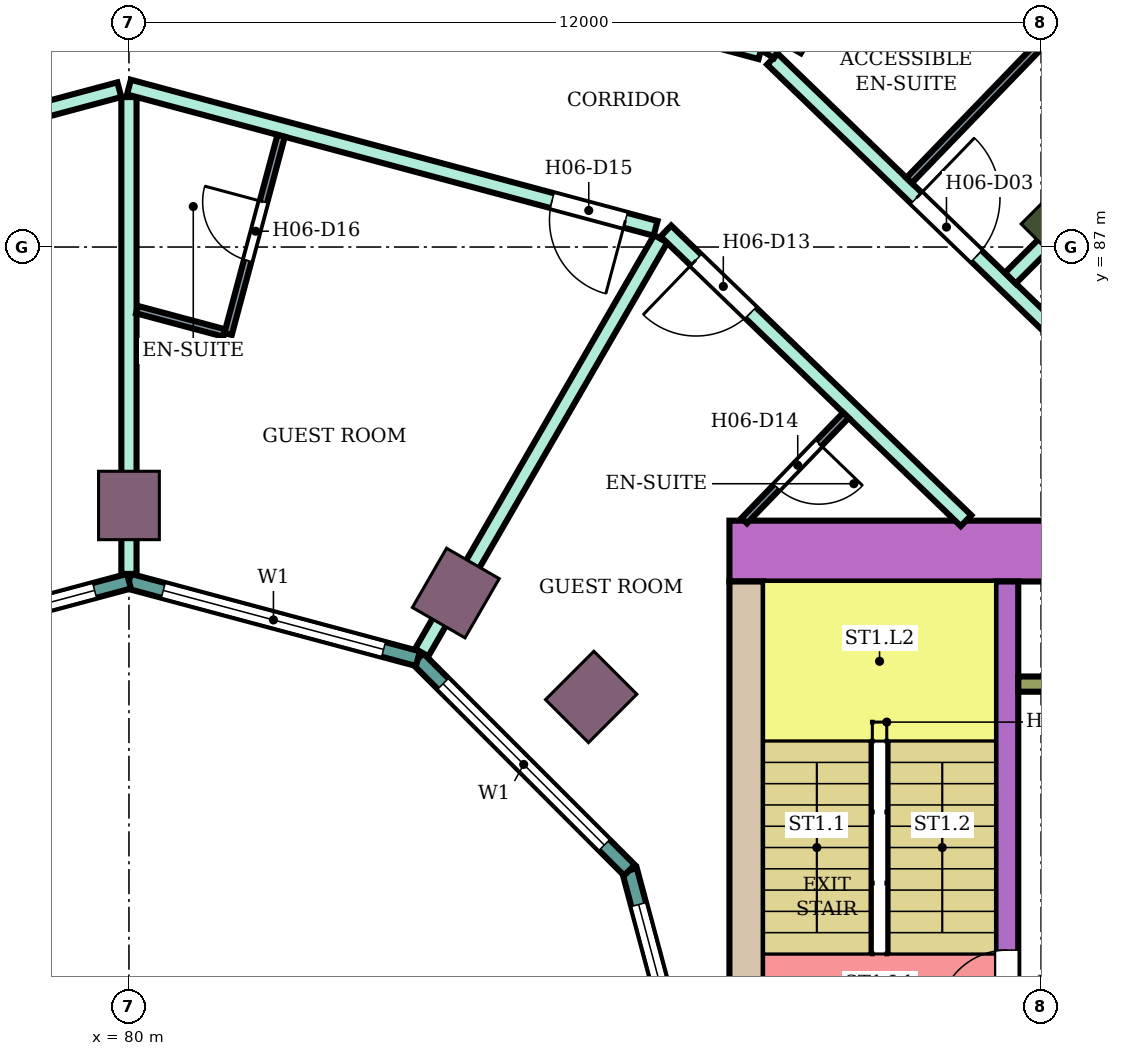
"""IFC4 building model, lengths in metres.
Left out: names, types, materials, properties, quantities, classifications, styles, units other than length and angle.
Written with IfcOpenShell. Run it as: python <this file> out.ifc"""

import sys

from ifc_helpers import new_model, si_unit, direction, frame, frame_2d, origin, origin_2d, place, context, subcontext, project, spatial, rectangle, extrude, element, fill, save


model = new_model("IFC4")
c1 = context("Model", 3, precision=1e-05, world=origin(), true_north=direction((0.0, 1.0)))
c2 = subcontext(c1, "Body", "Model", "MODEL_VIEW")
j1 = project(units=[si_unit("LENGTHUNIT", "METRE"), si_unit("PLANEANGLEUNIT", "RADIAN")], contexts=[c1])
p1 = place(None, origin())
s1 = spatial("IfcSite", under=j1, at=p1, CompositionType="ELEMENT")
p2 = place(p1, origin())
s2 = spatial("IfcBuilding", under=s1, at=p2, CompositionType="ELEMENT")
p3 = place(p2, frame((0.0, 0.0, 93.8)))
s3 = spatial("IfcBuildingStorey", under=s2, at=p3, CompositionType="ELEMENT", Elevation=93.8)
for number, where, z_axis, x_axis in (
    (1, (92.445, 87.445, 0.0), (0.0, 0.0, 1.0), (0.707, 0.707, 0.0)),
    (2, (88.8, 90.242, 0.0), (0.0, 0.0, 1.0), (0.5, 0.866, 0.0)),
):
    element("IfcColumn", number, at=place(p3, frame(where, z_axis=z_axis, x_axis=x_axis)), inside=s3, PredefinedType="COLUMN", context=c2, shape_type="SweptSolid", body=[
        extrude(rectangle(XDim=1.2, YDim=0.8, at=origin_2d()), origin(), (0.0, 0.0, 1.0), 3.8),
    ])
for number, where, z_axis, x_axis in (
    (3, (86.081, 81.081, 0.0), (0.0, 0.0, 1.0), (0.707, 0.707, 0.0)),
    (4, (84.3, 82.448, 0.0), (0.0, 0.0, 1.0), (0.5, 0.866, 0.0)),
    (5, (80.0, 83.6, 0.0), (0.0, 0.0, 1.0), (0.0, 1.0, 0.0)),
):
    element("IfcColumn", number, at=place(p3, frame(where, z_axis=z_axis, x_axis=x_axis)), inside=s3, PredefinedType="COLUMN", context=c2, shape_type="SweptSolid", body=[
        extrude(rectangle(XDim=0.9, YDim=0.8, at=origin_2d()), origin(), (0.0, 0.0, 1.0), 3.8),
    ])
p4 = place(p3, frame((87.9, 83.0, 0.0), z_axis=(0.0, 0.0, 1.0), x_axis=(1.0, 0.0, 0.0)))
e6 = element("IfcWall", 6, at=p4, inside=s3, PredefinedType="SHEAR", context=c2, shape_type="SweptSolid", body=[
    extrude(rectangle(XDim=14.7, YDim=0.8, at=frame_2d((7.35, 0.0))), origin(), (0.0, 0.0, 1.0), 3.48),
])
p5 = place(p4, frame((4.2, 0.0, 0.0)))
e7 = element("IfcOpeningElement", 7, at=p5, cuts=e6, PredefinedType="OPENING", context=c2, shape_type="SweptSolid", body=[
    extrude(rectangle(XDim=2.4, YDim=2.4, at=frame_2d((1.2, 1.2))), frame((0.0, 0.41, 0.0), z_axis=(0.0, -1.0, 0.0), x_axis=(1.0, 0.0, 0.0)), (0.0, 0.0, 1.0), 0.82),
])
p6 = place(p3, frame((88.125, 75.0, 0.0), z_axis=(0.0, 0.0, 1.0), x_axis=(0.0, 1.0, 0.0)))
e8 = element("IfcWall", 8, at=p6, inside=s3, PredefinedType="SHEAR", context=c2, shape_type="SweptSolid", body=[
    extrude(rectangle(XDim=7.6, YDim=0.45, at=frame_2d((3.8, 0.0))), origin(), (0.0, 0.0, 1.0), 3.48),
])
p7 = place(p3, frame((91.55, 75.0, 0.0), z_axis=(0.0, 0.0, 1.0), x_axis=(0.0, 1.0, 0.0)))
e9 = element("IfcWall", 9, at=p7, inside=s3, PredefinedType="SHEAR", context=c2, shape_type="SweptSolid", body=[
    extrude(rectangle(XDim=7.6, YDim=0.3, at=frame_2d((3.8, 0.0))), origin(), (0.0, 0.0, 1.0), 3.48),
])
p8 = place(p7, frame((1.85, 0.0, 0.0)))
e10 = element("IfcOpeningElement", 10, at=p8, cuts=e9, PredefinedType="OPENING", context=c2, shape_type="SweptSolid", body=[
    extrude(rectangle(XDim=0.9, YDim=2.1, at=frame_2d((0.45, 1.05))), frame((0.0, 0.16, 0.0), z_axis=(0.0, -1.0, 0.0), x_axis=(1.0, 0.0, 0.0)), (0.0, 0.0, 1.0), 0.32),
])
p9 = place(p3, frame((91.7, 81.25, 0.0), z_axis=(0.0, 0.0, 1.0), x_axis=(1.0, 0.0, 0.0)))
e11 = element("IfcWall", 11, at=p9, inside=s3, PredefinedType="SHEAR", context=c2, shape_type="SweptSolid", body=[
    extrude(rectangle(XDim=4.65, YDim=0.2, at=frame_2d((2.325, 0.0))), origin(), (0.0, 0.0, 1.0), 3.48),
])
p10 = place(p3, frame((87.604, 75.0, 0.0), z_axis=(0.0, 0.0, 1.0), x_axis=(-0.258789828301, 0.965933654434, 0.0)))
e12 = element("IfcWall", 12, at=p10, inside=s3, PredefinedType="NOTDEFINED", context=c2, shape_type="SweptSolid", body=[
    extrude(rectangle(XDim=3.936, YDim=0.2, at=frame_2d((1.968, 0.0))), origin(), (0.0, 0.0, 1.0), 3.8),
])
p11 = place(p10, frame((0.468, 0.0, 0.9)))
e13 = element("IfcOpeningElement", 13, at=p11, cuts=e12, PredefinedType="OPENING", context=c2, shape_type="SweptSolid", body=[
    extrude(rectangle(XDim=3.0, YDim=2.3, at=frame_2d((1.5, 1.15))), frame((0.0, 0.11, 0.0), z_axis=(0.0, -1.0, 0.0), x_axis=(1.0, 0.0, 0.0)), (0.0, 0.0, 1.0), 0.22),
])
p12 = place(p3, frame((86.585, 78.802, 0.0), z_axis=(0.0, 0.0, 1.0), x_axis=(-0.707106781187, 0.707106781187, 0.0)))
e14 = element("IfcWall", 14, at=p12, inside=s3, PredefinedType="NOTDEFINED", context=c2, shape_type="SweptSolid", body=[
    extrude(rectangle(XDim=3.936, YDim=0.2, at=frame_2d((1.968, 0.0))), origin(), (0.0, 0.0, 1.0), 3.8),
])
p13 = place(p12, frame((0.468, 0.0, 0.9)))
e15 = element("IfcOpeningElement", 15, at=p13, cuts=e14, PredefinedType="OPENING", context=c2, shape_type="SweptSolid", body=[
    extrude(rectangle(XDim=3.0, YDim=2.3, at=frame_2d((1.5, 1.15))), frame((0.0, 0.11, 0.0), z_axis=(0.0, -1.0, 0.0), x_axis=(1.0, 0.0, 0.0)), (0.0, 0.0, 1.0), 0.22),
])
p14 = place(p3, frame((83.802, 81.585, 0.0), z_axis=(0.0, 0.0, 1.0), x_axis=(-0.965933654434, 0.258789828301, 0.0)))
e16 = element("IfcWall", 16, at=p14, inside=s3, PredefinedType="NOTDEFINED", context=c2, shape_type="SweptSolid", body=[
    extrude(rectangle(XDim=3.936, YDim=0.2, at=frame_2d((1.968, 0.0))), origin(), (0.0, 0.0, 1.0), 3.8),
])
p15 = place(p14, frame((0.468, 0.0, 0.9)))
e17 = element("IfcOpeningElement", 17, at=p15, cuts=e16, PredefinedType="OPENING", context=c2, shape_type="SweptSolid", body=[
    extrude(rectangle(XDim=3.0, YDim=2.3, at=frame_2d((1.5, 1.15))), frame((0.0, 0.11, 0.0), z_axis=(0.0, -1.0, 0.0), x_axis=(1.0, 0.0, 0.0)), (0.0, 0.0, 1.0), 0.22),
])
p16 = place(p3, frame((80.0, 82.604, 0.0), z_axis=(0.0, 0.0, 1.0), x_axis=(-0.965933654434, -0.258789828301, 0.0)))
e18 = element("IfcWall", 18, at=p16, inside=s3, PredefinedType="NOTDEFINED", context=c2, shape_type="SweptSolid", body=[
    extrude(rectangle(XDim=3.936, YDim=0.2, at=frame_2d((1.968, 0.0))), origin(), (0.0, 0.0, 1.0), 3.8),
])
p17 = place(p16, frame((0.468, 0.0, 0.9)))
e19 = element("IfcOpeningElement", 19, at=p17, cuts=e18, PredefinedType="OPENING", context=c2, shape_type="SweptSolid", body=[
    extrude(rectangle(XDim=3.0, YDim=2.3, at=frame_2d((1.5, 1.15))), frame((0.0, 0.11, 0.0), z_axis=(0.0, -1.0, 0.0), x_axis=(1.0, 0.0, 0.0)), (0.0, 0.0, 1.0), 0.22),
])
p18 = place(p3, frame((71.614, 89.55, 0.0), z_axis=(0.0, 0.0, 1.0), x_axis=(0.965982378603, 0.258607896685, 0.0)))
e20 = element("IfcWall", 20, at=p18, inside=s3, PredefinedType="PARTITIONING", context=c2, shape_type="SweptSolid", body=[
    extrude(rectangle(XDim=8.632, YDim=0.2, at=frame_2d((4.316, 0.0))), origin(), (0.0, 0.0, 1.0), 3.35),
])
p19 = place(p18, frame((2.804, 0.0, 0.0)))
e21 = element("IfcOpeningElement", 21, at=p19, cuts=e20, PredefinedType="OPENING", context=c2, shape_type="SweptSolid", body=[
    extrude(rectangle(XDim=1.0, YDim=2.1, at=frame_2d((0.5, 1.05))), frame((0.0, 0.11, 0.0), z_axis=(0.0, -1.0, 0.0), x_axis=(1.0, 0.0, 0.0)), (0.0, 0.0, 1.0), 0.22),
])
p20 = place(p3, frame((72.936, 87.211, 0.0), z_axis=(0.0, 0.0, 1.0), x_axis=(0.965917703859, 0.258849356521, 0.0)))
e22 = element("IfcWall", 22, at=p20, inside=s3, PredefinedType="PARTITIONING", context=c2, shape_type="SweptSolid", body=[
    extrude(rectangle(XDim=7.182, YDim=0.2, at=frame_2d((3.591, 0.0))), origin(), (0.0, 0.0, 1.0), 3.35),
])
p21 = place(p20, frame((2.757, 0.0, 0.0)))
e23 = element("IfcOpeningElement", 23, at=p21, cuts=e22, PredefinedType="OPENING", context=c2, shape_type="SweptSolid", body=[
    extrude(rectangle(XDim=1.8, YDim=2.1, at=frame_2d((0.9, 1.05))), frame((0.0, 0.11, 0.0), z_axis=(0.0, -1.0, 0.0), x_axis=(1.0, 0.0, 0.0)), (0.0, 0.0, 1.0), 0.22),
])
p22 = place(p3, frame((80.0, 82.7, 0.0), z_axis=(0.0, 0.0, 1.0), x_axis=(0.0, 1.0, 0.0)))
e24 = element("IfcWall", 24, at=p22, inside=s3, PredefinedType="PARTITIONING", context=c2, shape_type="SweptSolid", body=[
    extrude(rectangle(XDim=6.273, YDim=0.2, at=frame_2d((3.136, 0.0))), origin(), (0.0, 0.0, 1.0), 3.35),
])
p23 = place(p3, frame((80.0, 89.104, 0.0), z_axis=(0.0, 0.0, 1.0), x_axis=(0.965856548257, -0.259077455964, 0.0)))
e25 = element("IfcWall", 25, at=p23, inside=s3, PredefinedType="PARTITIONING", context=c2, shape_type="SweptSolid", body=[
    extrude(rectangle(XDim=7.173, YDim=0.2, at=frame_2d((3.586, 0.0))), origin(), (0.0, 0.0, 1.0), 3.35),
])
p24 = place(p23, frame((5.763, 0.0, 0.0)))
e26 = element("IfcOpeningElement", 26, at=p24, cuts=e25, PredefinedType="OPENING", context=c2, shape_type="SweptSolid", body=[
    extrude(rectangle(XDim=1.0, YDim=2.1, at=frame_2d((0.5, 1.05))), frame((0.0, 0.11, 0.0), z_axis=(0.0, -1.0, 0.0), x_axis=(1.0, 0.0, 0.0)), (0.0, 0.0, 1.0), 0.22),
])
p25 = place(p3, frame((80.0, 91.796, 0.0), z_axis=(0.0, 0.0, 1.0), x_axis=(0.965917643923, -0.258849580177, 0.0)))
e27 = element("IfcWall", 27, at=p25, inside=s3, PredefinedType="PARTITIONING", context=c2, shape_type="SweptSolid", body=[
    extrude(rectangle(XDim=8.602, YDim=0.2, at=frame_2d((4.301, 0.0))), origin(), (0.0, 0.0, 1.0), 3.35),
])
p26 = place(p25, frame((2.091, 0.0, 0.0)))
e28 = element("IfcOpeningElement", 28, at=p26, cuts=e27, PredefinedType="OPENING", context=c2, shape_type="SweptSolid", body=[
    extrude(rectangle(XDim=1.8, YDim=2.1, at=frame_2d((0.9, 1.05))), frame((0.0, 0.11, 0.0), z_axis=(0.0, -1.0, 0.0), x_axis=(1.0, 0.0, 0.0)), (0.0, 0.0, 1.0), 0.22),
])
p27 = place(p3, frame((83.852, 81.665, 0.0), z_axis=(0.0, 0.0, 1.0), x_axis=(0.500236829077, 0.86588862727, 0.0)))
e29 = element("IfcWall", 29, at=p27, inside=s3, PredefinedType="PARTITIONING", context=c2, shape_type="SweptSolid", body=[
    extrude(rectangle(XDim=6.286, YDim=0.2, at=frame_2d((3.143, 0.0))), origin(), (0.0, 0.0, 1.0), 3.35),
])
p28 = place(p3, frame((87.064, 87.211, 0.0), z_axis=(0.0, 0.0, 1.0), x_axis=(0.719540958932, -0.694450004262, 0.0)))
e30 = element("IfcWall", 30, at=p28, inside=s3, PredefinedType="PARTITIONING", context=c2, shape_type="SweptSolid", body=[
    extrude(rectangle(XDim=5.488, YDim=0.2, at=frame_2d((2.744, 0.0))), origin(), (0.0, 0.0, 1.0), 3.35),
])
p29 = place(p28, frame((0.55, 0.0, 0.0)))
e31 = element("IfcOpeningElement", 31, at=p29, cuts=e30, PredefinedType="OPENING", context=c2, shape_type="SweptSolid", body=[
    extrude(rectangle(XDim=1.0, YDim=2.1, at=frame_2d((0.5, 1.05))), frame((0.0, 0.11, 0.0), z_axis=(0.0, -1.0, 0.0), x_axis=(1.0, 0.0, 0.0)), (0.0, 0.0, 1.0), 0.22),
])
p30 = place(p3, frame((88.465, 89.473, 0.0), z_axis=(0.0, 0.0, 1.0), x_axis=(0.719474304909, -0.694519059908, 0.0)))
e32 = element("IfcWall", 32, at=p30, inside=s3, PredefinedType="PARTITIONING", context=c2, shape_type="SweptSolid", body=[
    extrude(rectangle(XDim=6.525, YDim=0.2, at=frame_2d((3.263, 0.0))), origin(), (0.0, 0.0, 1.0), 3.35),
])
p31 = place(p30, frame((2.633, 0.0, 0.0)))
e33 = element("IfcOpeningElement", 33, at=p31, cuts=e32, PredefinedType="OPENING", context=c2, shape_type="SweptSolid", body=[
    extrude(rectangle(XDim=1.1, YDim=2.1, at=frame_2d((0.55, 1.05))), frame((0.0, 0.11, 0.0), z_axis=(0.0, -1.0, 0.0), x_axis=(1.0, 0.0, 0.0)), (0.0, 0.0, 1.0), 0.22),
])
p32 = place(p3, frame((88.4, 89.538, 0.0), z_axis=(0.0, 0.0, 1.0), x_axis=(0.500234695877, 0.865889859648, 0.0)))
e34 = element("IfcWall", 34, at=p32, inside=s3, PredefinedType="PARTITIONING", context=c2, shape_type="SweptSolid", body=[
    extrude(rectangle(XDim=9.007, YDim=0.2, at=frame_2d((4.503, 0.0))), origin(), (0.0, 0.0, 1.0), 3.35),
])
p33 = place(p3, frame((91.595, 86.59, 0.0), z_axis=(0.0, 0.0, 1.0), x_axis=(0.707232337591, 0.706981202484, 0.0)))
e35 = element("IfcWall", 35, at=p33, inside=s3, PredefinedType="PARTITIONING", context=c2, shape_type="SweptSolid", body=[
    extrude(rectangle(XDim=6.805, YDim=0.2, at=frame_2d((3.402, 0.0))), origin(), (0.0, 0.0, 1.0), 3.35),
])
p34 = place(p3, frame((80.106, 86.177, 0.0), z_axis=(0.0, 0.0, 1.0), x_axis=(0.966002973184, -0.258530957139, 0.0)))
e36 = element("IfcWall", 36, at=p34, inside=s3, PredefinedType="PARTITIONING", context=c2, shape_type="SweptSolid", body=[
    extrude(rectangle(XDim=1.19, YDim=0.1, at=frame_2d((0.595, 0.0))), origin(), (0.0, 0.0, 1.0), 3.35),
])
p35 = place(p3, frame((81.304, 85.856, 0.0), z_axis=(0.0, 0.0, 1.0), x_axis=(0.25867580527, 0.965964195904, 0.0)))
e37 = element("IfcWall", 37, at=p35, inside=s3, PredefinedType="PARTITIONING", context=c2, shape_type="SweptSolid", body=[
    extrude(rectangle(XDim=2.699, YDim=0.1, at=frame_2d((1.35, 0.0))), origin(), (0.0, 0.0, 1.0), 3.35),
])
p36 = place(p35, frame((1.0, 0.0, 0.0)))
e38 = element("IfcOpeningElement", 38, at=p36, cuts=e37, PredefinedType="OPENING", context=c2, shape_type="SweptSolid", body=[
    extrude(rectangle(XDim=0.8, YDim=2.1, at=frame_2d((0.4, 1.05))), frame((0.0, 0.06, 0.0), z_axis=(0.0, -1.0, 0.0), x_axis=(1.0, 0.0, 0.0)), (0.0, 0.0, 1.0), 0.12),
])
p37 = place(p3, frame((88.095, 83.4, 0.0), z_axis=(0.0, 0.0, 1.0), x_axis=(0.694447472534, 0.719543402368, 0.0)))
e39 = element("IfcWall", 39, at=p37, inside=s3, PredefinedType="PARTITIONING", context=c2, shape_type="SweptSolid", body=[
    extrude(rectangle(XDim=1.926, YDim=0.1, at=frame_2d((0.963, 0.0))), origin(), (0.0, 0.0, 1.0), 3.35),
])
p38 = place(p37, frame((0.613, 0.0, 0.0)))
e40 = element("IfcOpeningElement", 40, at=p38, cuts=e39, PredefinedType="OPENING", context=c2, shape_type="SweptSolid", body=[
    extrude(rectangle(XDim=0.8, YDim=2.1, at=frame_2d((0.4, 1.05))), frame((0.0, 0.06, 0.0), z_axis=(0.0, -1.0, 0.0), x_axis=(1.0, 0.0, 0.0)), (0.0, 0.0, 1.0), 0.12),
])
p39 = place(p3, frame((90.263, 87.876, 0.0), z_axis=(0.0, 0.0, 1.0), x_axis=(0.694534400859, 0.719459495749, 0.0)))
e41 = element("IfcWall", 41, at=p39, inside=s3, PredefinedType="PARTITIONING", context=c2, shape_type="SweptSolid", body=[
    extrude(rectangle(XDim=2.899, YDim=0.1, at=frame_2d((1.45, 0.0))), origin(), (0.0, 0.0, 1.0), 3.35),
])
p40 = place(p11, origin())
e42 = element("IfcWindow", 42, at=p40, inside=s3, PartitioningType="SINGLE_PANEL", PredefinedType="WINDOW", context=c2, shape_type="SweptSolid", body=[
    extrude(rectangle(XDim=3.0, YDim=2.3, at=frame_2d((1.5, 1.15))), frame((0.0, 0.03, 0.0), z_axis=(0.0, -1.0, 0.0), x_axis=(1.0, 0.0, 0.0)), (0.0, 0.0, 1.0), 0.06),
])
fill(e13, e42)
p41 = place(p13, origin())
e43 = element("IfcWindow", 43, at=p41, inside=s3, PartitioningType="SINGLE_PANEL", PredefinedType="WINDOW", context=c2, shape_type="SweptSolid", body=[
    extrude(rectangle(XDim=3.0, YDim=2.3, at=frame_2d((1.5, 1.15))), frame((0.0, 0.03, 0.0), z_axis=(0.0, -1.0, 0.0), x_axis=(1.0, 0.0, 0.0)), (0.0, 0.0, 1.0), 0.06),
])
fill(e15, e43)
p42 = place(p15, origin())
e44 = element("IfcWindow", 44, at=p42, inside=s3, PartitioningType="SINGLE_PANEL", PredefinedType="WINDOW", context=c2, shape_type="SweptSolid", body=[
    extrude(rectangle(XDim=3.0, YDim=2.3, at=frame_2d((1.5, 1.15))), frame((0.0, 0.03, 0.0), z_axis=(0.0, -1.0, 0.0), x_axis=(1.0, 0.0, 0.0)), (0.0, 0.0, 1.0), 0.06),
])
fill(e17, e44)
p43 = place(p17, origin())
e45 = element("IfcWindow", 45, at=p43, inside=s3, PartitioningType="SINGLE_PANEL", PredefinedType="WINDOW", context=c2, shape_type="SweptSolid", body=[
    extrude(rectangle(XDim=3.0, YDim=2.3, at=frame_2d((1.5, 1.15))), frame((0.0, 0.03, 0.0), z_axis=(0.0, -1.0, 0.0), x_axis=(1.0, 0.0, 0.0)), (0.0, 0.0, 1.0), 0.06),
])
fill(e19, e45)
p44 = place(p31, origin())
e46 = element("IfcDoor", 46, at=p44, inside=s3, OperationType="SINGLE_SWING_LEFT", PredefinedType="DOOR", context=c2, shape_type="SweptSolid", body=[
    extrude(rectangle(XDim=1.1, YDim=2.1, at=frame_2d((0.55, 1.05))), frame((0.0, 0.025, 0.0), z_axis=(0.0, -1.0, 0.0), x_axis=(1.0, 0.0, 0.0)), (0.0, 0.0, 1.0), 0.05),
])
fill(e33, e46)
p45 = place(p29, frame((1.0, 0.0, 0.0), z_axis=(0.0, 0.0, 1.0), x_axis=(-1.0, 0.0, 0.0)))
e47 = element("IfcDoor", 47, at=p45, inside=s3, OperationType="SINGLE_SWING_RIGHT", PredefinedType="DOOR", context=c2, shape_type="SweptSolid", body=[
    extrude(rectangle(XDim=1.0, YDim=2.1, at=frame_2d((0.5, 1.05))), frame((0.0, 0.025, 0.0), z_axis=(0.0, -1.0, 0.0), x_axis=(1.0, 0.0, 0.0)), (0.0, 0.0, 1.0), 0.05),
])
fill(e31, e47)
p46 = place(p38, frame((0.8, 0.0, 0.0), z_axis=(0.0, 0.0, 1.0), x_axis=(-1.0, 0.0, 0.0)))
e48 = element("IfcDoor", 48, at=p46, inside=s3, OperationType="SINGLE_SWING_LEFT", PredefinedType="DOOR", context=c2, shape_type="SweptSolid", body=[
    extrude(rectangle(XDim=0.8, YDim=2.1, at=frame_2d((0.4, 1.05))), frame((0.0, 0.025, 0.0), z_axis=(0.0, -1.0, 0.0), x_axis=(1.0, 0.0, 0.0)), (0.0, 0.0, 1.0), 0.05),
])
fill(e40, e48)
p47 = place(p24, frame((1.0, 0.0, 0.0), z_axis=(0.0, 0.0, 1.0), x_axis=(-1.0, 0.0, 0.0)))
e49 = element("IfcDoor", 49, at=p47, inside=s3, OperationType="SINGLE_SWING_LEFT", PredefinedType="DOOR", context=c2, shape_type="SweptSolid", body=[
    extrude(rectangle(XDim=1.0, YDim=2.1, at=frame_2d((0.5, 1.05))), frame((0.0, 0.025, 0.0), z_axis=(0.0, -1.0, 0.0), x_axis=(1.0, 0.0, 0.0)), (0.0, 0.0, 1.0), 0.05),
])
fill(e26, e49)
p48 = place(p36, origin())
e50 = element("IfcDoor", 50, at=p48, inside=s3, OperationType="SINGLE_SWING_RIGHT", PredefinedType="DOOR", context=c2, shape_type="SweptSolid", body=[
    extrude(rectangle(XDim=0.8, YDim=2.1, at=frame_2d((0.4, 1.05))), frame((0.0, 0.025, 0.0), z_axis=(0.0, -1.0, 0.0), x_axis=(1.0, 0.0, 0.0)), (0.0, 0.0, 1.0), 0.05),
])
fill(e38, e50)
p49 = place(p8, origin())
e51 = element("IfcDoor", 51, at=p49, inside=s3, OperationType="SINGLE_SWING_LEFT", PredefinedType="DOOR", context=c2, shape_type="SweptSolid", body=[
    extrude(rectangle(XDim=0.9, YDim=2.1, at=frame_2d((0.45, 1.05))), frame((0.0, 0.025, 0.0), z_axis=(0.0, -1.0, 0.0), x_axis=(1.0, 0.0, 0.0)), (0.0, 0.0, 1.0), 0.05),
])
fill(e10, e51)
save(model, sys.argv[1])
